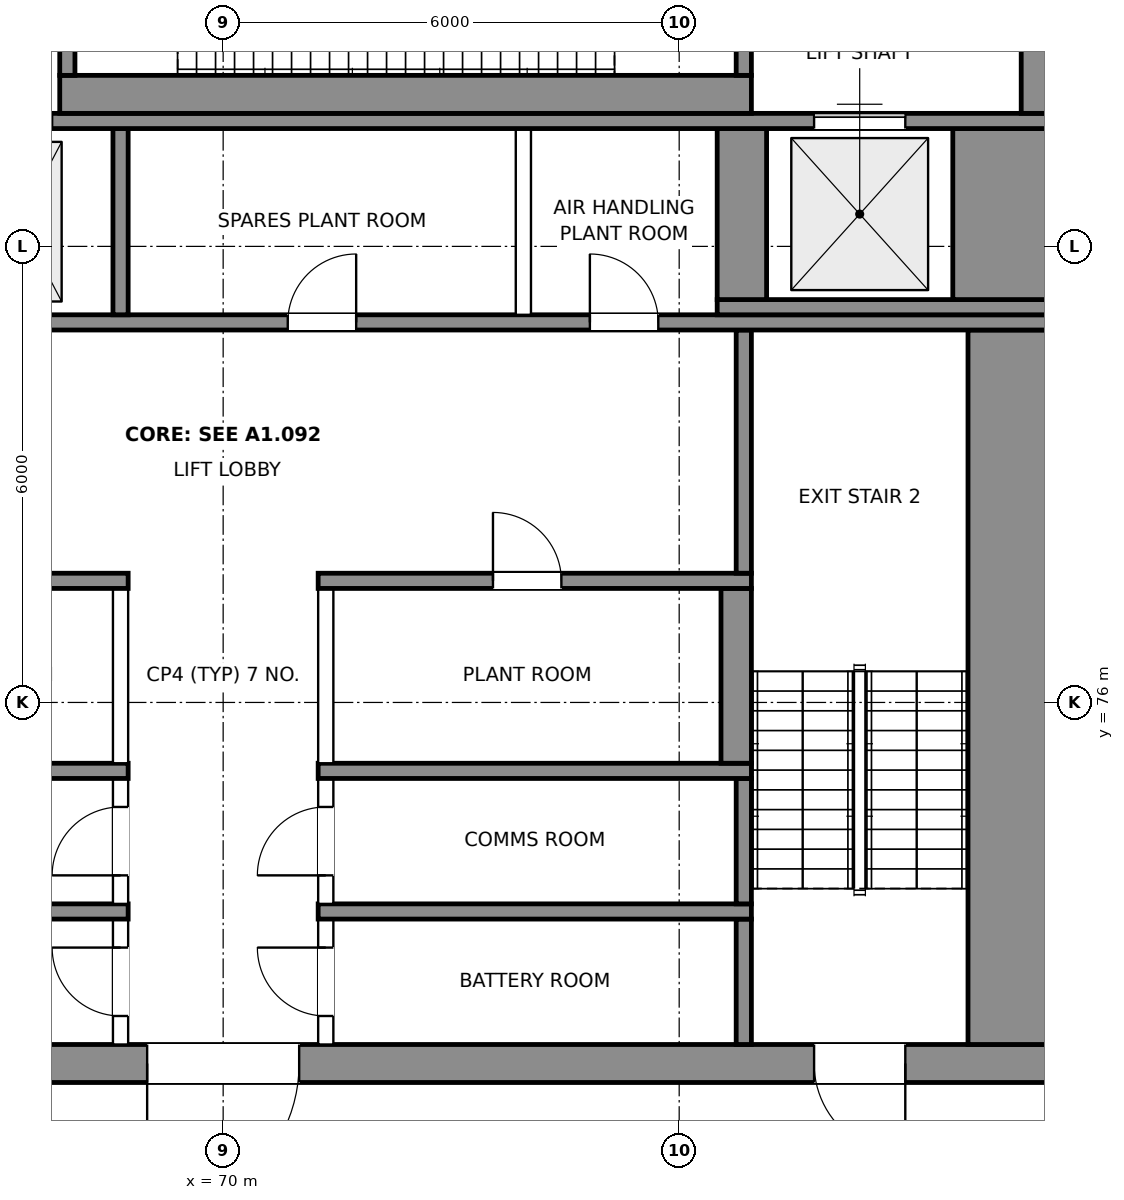
"""IFC4 building model, lengths in metres.
Left out: names, types, materials, properties, quantities, classifications, styles, units other than length and angle.
Written with IfcOpenShell. Run it as: python <this file> out.ifc"""

import sys

from ifc_helpers import new_model, si_unit, direction, frame, frame_2d, origin, place, context, subcontext, project, spatial, rectangle, extrude, element, fill, save


model = new_model("IFC4")
c1 = context("Model", 3, precision=1e-05, world=origin(), true_north=direction((0.0, 1.0)))
c2 = subcontext(c1, "Body", "Model", "MODEL_VIEW")
j1 = project(units=[si_unit("LENGTHUNIT", "METRE"), si_unit("PLANEANGLEUNIT", "RADIAN")], contexts=[c1])
p1 = place(None, origin())
s1 = spatial("IfcSite", under=j1, at=p1, CompositionType="ELEMENT")
p2 = place(p1, origin())
s2 = spatial("IfcBuilding", under=s1, at=p2, CompositionType="ELEMENT")
p3 = place(p2, frame((0.0, 0.0, 333.2)))
s3 = spatial("IfcBuildingStorey", under=s2, at=p3, CompositionType="ELEMENT", Elevation=333.2)
p4 = place(p3, frame((59.0, 71.25, 0.0), z_axis=(0.0, 0.0, 1.0), x_axis=(1.0, 0.0, 0.0)))
e1 = element("IfcWall", 1, at=p4, inside=s3, PredefinedType="SHEAR", context=c2, shape_type="SweptSolid", body=[
    extrude(rectangle(XDim=22.0, YDim=0.5, at=frame_2d((11.0, 0.0))), origin(), (0.0, 0.0, 1.0), 4.5),
])
p5 = place(p4, frame((2.025, 0.0, 0.0)))
e2 = element("IfcOpeningElement", 2, at=p5, cuts=e1, PredefinedType="OPENING", context=c2, shape_type="SweptSolid", body=[
    extrude(rectangle(XDim=1.2, YDim=2.1, at=frame_2d((0.6, 1.05))), frame((0.0, 0.26, 0.0), z_axis=(0.0, -1.0, 0.0), x_axis=(1.0, 0.0, 0.0)), (0.0, 0.0, 1.0), 0.52),
])
p6 = place(p4, frame((18.775, 0.0, 0.0)))
e3 = element("IfcOpeningElement", 3, at=p6, cuts=e1, PredefinedType="OPENING", context=c2, shape_type="SweptSolid", body=[
    extrude(rectangle(XDim=1.2, YDim=2.1, at=frame_2d((0.6, 1.05))), frame((0.0, 0.26, 0.0), z_axis=(0.0, -1.0, 0.0), x_axis=(1.0, 0.0, 0.0)), (0.0, 0.0, 1.0), 0.52),
])
p7 = place(p4, frame((10.0, 0.0, 0.0)))
e4 = element("IfcOpeningElement", 4, at=p7, cuts=e1, PredefinedType="OPENING", context=c2, shape_type="SweptSolid", body=[
    extrude(rectangle(XDim=2.0, YDim=2.1, at=frame_2d((1.0, 1.05))), frame((0.0, 0.26, 0.0), z_axis=(0.0, -1.0, 0.0), x_axis=(1.0, 0.0, 0.0)), (0.0, 0.0, 1.0), 0.52),
])
p8 = place(p3, frame((68.65, 71.5, 0.0), z_axis=(0.0, 0.0, 1.0), x_axis=(0.0, 1.0, 0.0)))
e5 = element("IfcWall", 5, at=p8, inside=s3, PredefinedType="PARTITIONING", context=c2, shape_type="SweptSolid", body=[
    extrude(rectangle(XDim=1.65, YDim=0.2, at=frame_2d((0.825, 0.0))), origin(), (0.0, 0.0, 1.0), 4.2),
])
p9 = place(p8, frame((0.375, 0.0, 0.0)))
e6 = element("IfcOpeningElement", 6, at=p9, cuts=e5, PredefinedType="OPENING", context=c2, shape_type="SweptSolid", body=[
    extrude(rectangle(XDim=0.9, YDim=2.1, at=frame_2d((0.45, 1.05))), frame((0.0, 0.11, 0.0), z_axis=(0.0, -1.0, 0.0), x_axis=(1.0, 0.0, 0.0)), (0.0, 0.0, 1.0), 0.22),
])
p10 = place(p3, frame((71.35, 71.5, 0.0), z_axis=(0.0, 0.0, 1.0), x_axis=(0.0, 1.0, 0.0)))
e7 = element("IfcWall", 7, at=p10, inside=s3, PredefinedType="PARTITIONING", context=c2, shape_type="SweptSolid", body=[
    extrude(rectangle(XDim=1.65, YDim=0.2, at=frame_2d((0.825, 0.0))), origin(), (0.0, 0.0, 1.0), 4.2),
])
p11 = place(p10, frame((0.375, 0.0, 0.0)))
e8 = element("IfcOpeningElement", 8, at=p11, cuts=e7, PredefinedType="OPENING", context=c2, shape_type="SweptSolid", body=[
    extrude(rectangle(XDim=0.9, YDim=2.1, at=frame_2d((0.45, 1.05))), frame((0.0, 0.11, 0.0), z_axis=(0.0, -1.0, 0.0), x_axis=(1.0, 0.0, 0.0)), (0.0, 0.0, 1.0), 0.22),
])
p12 = place(p3, frame((76.85, 71.5, 0.0), z_axis=(0.0, 0.0, 1.0), x_axis=(0.0, 1.0, 0.0)))
e9 = element("IfcWall", 9, at=p12, inside=s3, PredefinedType="SHEAR", context=c2, shape_type="SweptSolid", body=[
    extrude(rectangle(XDim=1.65, YDim=0.2, at=frame_2d((0.825, 0.0))), origin(), (0.0, 0.0, 1.0), 4.5),
])
p13 = place(p3, frame((80.4, 71.5, 0.0), z_axis=(0.0, 0.0, 1.0), x_axis=(0.0, 1.0, 0.0)))
e10 = element("IfcWall", 10, at=p13, inside=s3, PredefinedType="SHEAR", context=c2, shape_type="SweptSolid", body=[
    extrude(rectangle(XDim=9.4, YDim=1.2, at=frame_2d((4.7, 0.0))), origin(), (0.0, 0.0, 1.0), 4.5),
])
for number, where, z_axis, x_axis in (
    (11, (63.05, 73.25, 0.0), (0.0, 0.0, 1.0), (1.0, 0.0, 0.0)),
    (12, (71.25, 73.25, 0.0), (0.0, 0.0, 1.0), (1.0, 0.0, 0.0)),
):
    element("IfcWall", number, at=place(p3, frame(where, z_axis=z_axis, x_axis=x_axis)), inside=s3, PredefinedType="SHEAR", context=c2, shape_type="SweptSolid", body=[
        extrude(rectangle(XDim=5.7, YDim=0.2, at=frame_2d((2.85, 0.0))), origin(), (0.0, 0.0, 1.0), 4.5),
    ])
p14 = place(p3, frame((68.65, 73.35, 0.0), z_axis=(0.0, 0.0, 1.0), x_axis=(0.0, 1.0, 0.0)))
e13 = element("IfcWall", 13, at=p14, inside=s3, PredefinedType="PARTITIONING", context=c2, shape_type="SweptSolid", body=[
    extrude(rectangle(XDim=1.65, YDim=0.2, at=frame_2d((0.825, 0.0))), origin(), (0.0, 0.0, 1.0), 4.2),
])
p15 = place(p14, frame((0.375, 0.0, 0.0)))
e14 = element("IfcOpeningElement", 14, at=p15, cuts=e13, PredefinedType="OPENING", context=c2, shape_type="SweptSolid", body=[
    extrude(rectangle(XDim=0.9, YDim=2.1, at=frame_2d((0.45, 1.05))), frame((0.0, 0.11, 0.0), z_axis=(0.0, -1.0, 0.0), x_axis=(1.0, 0.0, 0.0)), (0.0, 0.0, 1.0), 0.22),
])
p16 = place(p3, frame((71.35, 73.35, 0.0), z_axis=(0.0, 0.0, 1.0), x_axis=(0.0, 1.0, 0.0)))
e15 = element("IfcWall", 15, at=p16, inside=s3, PredefinedType="PARTITIONING", context=c2, shape_type="SweptSolid", body=[
    extrude(rectangle(XDim=1.65, YDim=0.2, at=frame_2d((0.825, 0.0))), origin(), (0.0, 0.0, 1.0), 4.2),
])
p17 = place(p16, frame((0.375, 0.0, 0.0)))
e16 = element("IfcOpeningElement", 16, at=p17, cuts=e15, PredefinedType="OPENING", context=c2, shape_type="SweptSolid", body=[
    extrude(rectangle(XDim=0.9, YDim=2.1, at=frame_2d((0.45, 1.05))), frame((0.0, 0.11, 0.0), z_axis=(0.0, -1.0, 0.0), x_axis=(1.0, 0.0, 0.0)), (0.0, 0.0, 1.0), 0.22),
])
p18 = place(p3, frame((76.85, 73.35, 0.0), z_axis=(0.0, 0.0, 1.0), x_axis=(0.0, 1.0, 0.0)))
e17 = element("IfcWall", 17, at=p18, inside=s3, PredefinedType="SHEAR", context=c2, shape_type="SweptSolid", body=[
    extrude(rectangle(XDim=1.65, YDim=0.2, at=frame_2d((0.825, 0.0))), origin(), (0.0, 0.0, 1.0), 4.5),
])
for number, where, z_axis, x_axis in (
    (18, (63.05, 75.1, 0.0), (0.0, 0.0, 1.0), (1.0, 0.0, 0.0)),
    (19, (71.25, 75.1, 0.0), (0.0, 0.0, 1.0), (1.0, 0.0, 0.0)),
):
    element("IfcWall", number, at=place(p3, frame(where, z_axis=z_axis, x_axis=x_axis)), inside=s3, PredefinedType="SHEAR", context=c2, shape_type="SweptSolid", body=[
        extrude(rectangle(XDim=5.7, YDim=0.2, at=frame_2d((2.85, 0.0))), origin(), (0.0, 0.0, 1.0), 4.5),
    ])
for number, where, z_axis, x_axis in (
    (20, (68.65, 75.2, 0.0), (0.0, 0.0, 1.0), (0.0, 1.0, 0.0)),
    (21, (71.35, 75.2, 0.0), (0.0, 0.0, 1.0), (0.0, 1.0, 0.0)),
):
    element("IfcWall", number, at=place(p3, frame(where, z_axis=z_axis, x_axis=x_axis)), inside=s3, PredefinedType="PARTITIONING", context=c2, shape_type="SweptSolid", body=[
        extrude(rectangle(XDim=2.3, YDim=0.2, at=frame_2d((1.15, 0.0))), origin(), (0.0, 0.0, 1.0), 4.2),
    ])
p19 = place(p3, frame((76.75, 75.2, 0.0), z_axis=(0.0, 0.0, 1.0), x_axis=(0.0, 1.0, 0.0)))
e22 = element("IfcWall", 22, at=p19, inside=s3, PredefinedType="SHEAR", context=c2, shape_type="SweptSolid", body=[
    extrude(rectangle(XDim=2.3, YDim=0.4, at=frame_2d((1.15, 0.0))), origin(), (0.0, 0.0, 1.0), 4.5),
])
p20 = place(p3, frame((63.05, 77.6, 0.0), z_axis=(0.0, 0.0, 1.0), x_axis=(1.0, 0.0, 0.0)))
e23 = element("IfcWall", 23, at=p20, inside=s3, PredefinedType="SHEAR", context=c2, shape_type="SweptSolid", body=[
    extrude(rectangle(XDim=5.7, YDim=0.2, at=frame_2d((2.85, 0.0))), origin(), (0.0, 0.0, 1.0), 4.5),
])
p21 = place(p20, frame((2.5, 0.0, 0.0)))
e24 = element("IfcOpeningElement", 24, at=p21, cuts=e23, PredefinedType="OPENING", context=c2, shape_type="SweptSolid", body=[
    extrude(rectangle(XDim=0.9, YDim=2.1, at=frame_2d((0.45, 1.05))), frame((0.0, 0.11, 0.0), z_axis=(0.0, -1.0, 0.0), x_axis=(1.0, 0.0, 0.0)), (0.0, 0.0, 1.0), 0.22),
])
p22 = place(p3, frame((71.25, 77.6, 0.0), z_axis=(0.0, 0.0, 1.0), x_axis=(1.0, 0.0, 0.0)))
e25 = element("IfcWall", 25, at=p22, inside=s3, PredefinedType="SHEAR", context=c2, shape_type="SweptSolid", body=[
    extrude(rectangle(XDim=5.7, YDim=0.2, at=frame_2d((2.85, 0.0))), origin(), (0.0, 0.0, 1.0), 4.5),
])
p23 = place(p22, frame((2.3, 0.0, 0.0)))
e26 = element("IfcOpeningElement", 26, at=p23, cuts=e25, PredefinedType="OPENING", context=c2, shape_type="SweptSolid", body=[
    extrude(rectangle(XDim=0.9, YDim=2.1, at=frame_2d((0.45, 1.05))), frame((0.0, 0.11, 0.0), z_axis=(0.0, -1.0, 0.0), x_axis=(1.0, 0.0, 0.0)), (0.0, 0.0, 1.0), 0.22),
])
p24 = place(p3, frame((76.85, 77.7, 0.0), z_axis=(0.0, 0.0, 1.0), x_axis=(0.0, 1.0, 0.0)))
e27 = element("IfcWall", 27, at=p24, inside=s3, PredefinedType="SHEAR", context=c2, shape_type="SweptSolid", body=[
    extrude(rectangle(XDim=3.2, YDim=0.2, at=frame_2d((1.6, 0.0))), origin(), (0.0, 0.0, 1.0), 4.5),
])
p25 = place(p3, frame((59.0, 81.0, 0.0), z_axis=(0.0, 0.0, 1.0), x_axis=(1.0, 0.0, 0.0)))
e28 = element("IfcWall", 28, at=p25, inside=s3, PredefinedType="SHEAR", context=c2, shape_type="SweptSolid", body=[
    extrude(rectangle(XDim=22.0, YDim=0.2, at=frame_2d((11.0, 0.0))), origin(), (0.0, 0.0, 1.0), 4.5),
])
p26 = place(p25, frame((11.85, 0.0, 0.0)))
e29 = element("IfcOpeningElement", 29, at=p26, cuts=e28, PredefinedType="OPENING", context=c2, shape_type="SweptSolid", body=[
    extrude(rectangle(XDim=0.9, YDim=2.1, at=frame_2d((0.45, 1.05))), frame((0.0, 0.11, 0.0), z_axis=(0.0, -1.0, 0.0), x_axis=(1.0, 0.0, 0.0)), (0.0, 0.0, 1.0), 0.22),
])
p27 = place(p25, frame((15.825, 0.0, 0.0)))
e30 = element("IfcOpeningElement", 30, at=p27, cuts=e28, PredefinedType="OPENING", context=c2, shape_type="SweptSolid", body=[
    extrude(rectangle(XDim=0.9, YDim=2.1, at=frame_2d((0.45, 1.05))), frame((0.0, 0.11, 0.0), z_axis=(0.0, -1.0, 0.0), x_axis=(1.0, 0.0, 0.0)), (0.0, 0.0, 1.0), 0.22),
])
p28 = place(p3, frame((68.65, 81.1, 0.0), z_axis=(0.0, 0.0, 1.0), x_axis=(0.0, 1.0, 0.0)))
e31 = element("IfcWall", 31, at=p28, inside=s3, PredefinedType="SHEAR", context=c2, shape_type="SweptSolid", body=[
    extrude(rectangle(XDim=2.45, YDim=0.2, at=frame_2d((1.225, 0.0))), origin(), (0.0, 0.0, 1.0), 4.5),
])
p29 = place(p3, frame((73.95, 81.1, 0.0), z_axis=(0.0, 0.0, 1.0), x_axis=(0.0, 1.0, 0.0)))
e32 = element("IfcWall", 32, at=p29, inside=s3, PredefinedType="PARTITIONING", context=c2, shape_type="SweptSolid", body=[
    extrude(rectangle(XDim=2.45, YDim=0.2, at=frame_2d((1.225, 0.0))), origin(), (0.0, 0.0, 1.0), 4.2),
])
p30 = place(p3, frame((76.5, 81.2, 0.0), z_axis=(0.0, 0.0, 1.0), x_axis=(1.0, 0.0, 0.0)))
e33 = element("IfcWall", 33, at=p30, inside=s3, PredefinedType="SHEAR", context=c2, shape_type="SweptSolid", body=[
    extrude(rectangle(XDim=4.5, YDim=0.2, at=frame_2d((2.25, 0.0))), origin(), (0.0, 0.0, 1.0), 4.5),
])
p31 = place(p3, frame((76.825, 81.3, 0.0), z_axis=(0.0, 0.0, 1.0), x_axis=(0.0, 1.0, 0.0)))
e34 = element("IfcWall", 34, at=p31, inside=s3, PredefinedType="SHEAR", context=c2, shape_type="SweptSolid", body=[
    extrude(rectangle(XDim=2.25, YDim=0.65, at=frame_2d((1.125, 0.0))), origin(), (0.0, 0.0, 1.0), 4.5),
])
p32 = place(p3, frame((80.3, 81.3, 0.0), z_axis=(0.0, 0.0, 1.0), x_axis=(0.0, 1.0, 0.0)))
e35 = element("IfcWall", 35, at=p32, inside=s3, PredefinedType="SHEAR", context=c2, shape_type="SweptSolid", body=[
    extrude(rectangle(XDim=2.25, YDim=1.4, at=frame_2d((1.125, 0.0))), origin(), (0.0, 0.0, 1.0), 4.5),
])
p33 = place(p3, frame((59.0, 83.65, 0.0), z_axis=(0.0, 0.0, 1.0), x_axis=(1.0, 0.0, 0.0)))
e36 = element("IfcWall", 36, at=p33, inside=s3, PredefinedType="SHEAR", context=c2, shape_type="SweptSolid", body=[
    extrude(rectangle(XDim=22.0, YDim=0.2, at=frame_2d((11.0, 0.0))), origin(), (0.0, 0.0, 1.0), 4.5),
])
p34 = place(p33, frame((5.125, 0.0, 0.0)))
e37 = element("IfcOpeningElement", 37, at=p34, cuts=e36, PredefinedType="OPENING", context=c2, shape_type="SweptSolid", body=[
    extrude(rectangle(XDim=1.1, YDim=2.1, at=frame_2d((0.55, 1.05))), frame((0.0, 0.11, 0.0), z_axis=(0.0, -1.0, 0.0), x_axis=(1.0, 0.0, 0.0)), (0.0, 0.0, 1.0), 0.22),
])
p35 = place(p33, frame((7.65, 0.0, 0.0)))
e38 = element("IfcOpeningElement", 38, at=p35, cuts=e36, PredefinedType="OPENING", context=c2, shape_type="SweptSolid", body=[
    extrude(rectangle(XDim=1.1, YDim=2.1, at=frame_2d((0.55, 1.05))), frame((0.0, 0.11, 0.0), z_axis=(0.0, -1.0, 0.0), x_axis=(1.0, 0.0, 0.0)), (0.0, 0.0, 1.0), 0.22),
])
p36 = place(p33, frame((18.775, 0.0, 0.0)))
e39 = element("IfcOpeningElement", 39, at=p36, cuts=e36, PredefinedType="OPENING", context=c2, shape_type="SweptSolid", body=[
    extrude(rectangle(XDim=1.2, YDim=2.1, at=frame_2d((0.6, 1.05))), frame((0.0, 0.11, 0.0), z_axis=(0.0, -1.0, 0.0), x_axis=(1.0, 0.0, 0.0)), (0.0, 0.0, 1.0), 0.22),
])
p37 = place(p33, frame((2.075, 0.0, 0.0)))
e40 = element("IfcOpeningElement", 40, at=p37, cuts=e36, PredefinedType="OPENING", context=c2, shape_type="SweptSolid", body=[
    extrude(rectangle(XDim=1.1, YDim=2.1, at=frame_2d((0.55, 1.05))), frame((0.0, 0.11, 0.0), z_axis=(0.0, -1.0, 0.0), x_axis=(1.0, 0.0, 0.0)), (0.0, 0.0, 1.0), 0.22),
])
p38 = place(p3, frame((67.85, 84.0, 0.0), z_axis=(0.0, 0.0, 1.0), x_axis=(1.0, 0.0, 0.0)))
e41 = element("IfcWall", 41, at=p38, inside=s3, PredefinedType="SHEAR", context=c2, shape_type="SweptSolid", body=[
    extrude(rectangle(XDim=9.1, YDim=0.5, at=frame_2d((4.55, 0.0))), origin(), (0.0, 0.0, 1.0), 4.5),
])
p39 = place(p3, frame((80.75, 83.75, 0.0), z_axis=(0.0, 0.0, 1.0), x_axis=(0.0, 1.0, 0.0)))
e42 = element("IfcWall", 42, at=p39, inside=s3, PredefinedType="SHEAR", context=c2, shape_type="SweptSolid", body=[
    extrude(rectangle(XDim=3.75, YDim=0.5, at=frame_2d((1.875, 0.0))), origin(), (0.0, 0.0, 1.0), 4.5),
])
p40 = place(p39, frame((1.275, 0.0, 0.0)))
e43 = element("IfcOpeningElement", 43, at=p40, cuts=e42, PredefinedType="OPENING", context=c2, shape_type="SweptSolid", body=[
    extrude(rectangle(XDim=1.2, YDim=2.1, at=frame_2d((0.6, 1.05))), frame((0.0, 0.26, 0.0), z_axis=(0.0, -1.0, 0.0), x_axis=(1.0, 0.0, 0.0)), (0.0, 0.0, 1.0), 0.52),
])
p41 = place(p3, frame((67.95, 84.25, 0.0), z_axis=(0.0, 0.0, 1.0), x_axis=(0.0, 1.0, 0.0)))
e44 = element("IfcWall", 44, at=p41, inside=s3, PredefinedType="SHEAR", context=c2, shape_type="SweptSolid", body=[
    extrude(rectangle(XDim=2.85, YDim=0.2, at=frame_2d((1.425, 0.0))), origin(), (0.0, 0.0, 1.0), 4.5),
])
p42 = place(p41, frame((0.825, 0.0, 0.0)))
e45 = element("IfcOpeningElement", 45, at=p42, cuts=e44, PredefinedType="OPENING", context=c2, shape_type="SweptSolid", body=[
    extrude(rectangle(XDim=1.2, YDim=2.1, at=frame_2d((0.6, 1.05))), frame((0.0, 0.11, 0.0), z_axis=(0.0, -1.0, 0.0), x_axis=(1.0, 0.0, 0.0)), (0.0, 0.0, 1.0), 0.22),
])
p43 = place(p3, frame((76.85, 84.25, 0.0), z_axis=(0.0, 0.0, 1.0), x_axis=(0.0, 1.0, 0.0)))
e46 = element("IfcWall", 46, at=p43, inside=s3, PredefinedType="SHEAR", context=c2, shape_type="SweptSolid", body=[
    extrude(rectangle(XDim=2.85, YDim=0.2, at=frame_2d((1.425, 0.0))), origin(), (0.0, 0.0, 1.0), 4.5),
])
p44 = place(p43, frame((1.575, 0.0, 0.0)))
e47 = element("IfcOpeningElement", 47, at=p44, cuts=e46, PredefinedType="OPENING", context=c2, shape_type="SweptSolid", body=[
    extrude(rectangle(XDim=1.2, YDim=2.1, at=frame_2d((0.6, 1.05))), frame((0.0, 0.11, 0.0), z_axis=(0.0, -1.0, 0.0), x_axis=(1.0, 0.0, 0.0)), (0.0, 0.0, 1.0), 0.22),
])
p45 = place(p6, frame((1.2, 0.0, 0.0), z_axis=(0.0, 0.0, 1.0), x_axis=(-1.0, 0.0, 0.0)))
e48 = element("IfcDoor", 48, at=p45, inside=s3, OperationType="SINGLE_SWING_LEFT", PredefinedType="DOOR", context=c2, shape_type="SweptSolid", body=[
    extrude(rectangle(XDim=1.2, YDim=2.1, at=frame_2d((0.6, 1.05))), frame((0.0, 0.025, 0.0), z_axis=(0.0, -1.0, 0.0), x_axis=(1.0, 0.0, 0.0)), (0.0, 0.0, 1.0), 0.05),
])
fill(e3, e48)
p46 = place(p7, frame((2.0, 0.0, 0.0), z_axis=(0.0, 0.0, 1.0), x_axis=(-1.0, 0.0, 0.0)))
e49 = element("IfcDoor", 49, at=p46, inside=s3, OperationType="DOUBLE_DOOR_SINGLE_SWING", PredefinedType="DOOR", context=c2, shape_type="SweptSolid", body=[
    extrude(rectangle(XDim=2.0, YDim=2.1, at=frame_2d((1.0, 1.05))), frame((0.0, 0.025, 0.0), z_axis=(0.0, -1.0, 0.0), x_axis=(1.0, 0.0, 0.0)), (0.0, 0.0, 1.0), 0.05),
])
fill(e4, e49)
p47 = place(p9, origin())
e50 = element("IfcDoor", 50, at=p47, inside=s3, OperationType="SINGLE_SWING_RIGHT", PredefinedType="DOOR", context=c2, shape_type="SweptSolid", body=[
    extrude(rectangle(XDim=0.9, YDim=2.1, at=frame_2d((0.45, 1.05))), frame((0.0, 0.025, 0.0), z_axis=(0.0, -1.0, 0.0), x_axis=(1.0, 0.0, 0.0)), (0.0, 0.0, 1.0), 0.05),
])
fill(e6, e50)
p48 = place(p15, origin())
e51 = element("IfcDoor", 51, at=p48, inside=s3, OperationType="SINGLE_SWING_LEFT", PredefinedType="DOOR", context=c2, shape_type="SweptSolid", body=[
    extrude(rectangle(XDim=0.9, YDim=2.1, at=frame_2d((0.45, 1.05))), frame((0.0, 0.025, 0.0), z_axis=(0.0, -1.0, 0.0), x_axis=(1.0, 0.0, 0.0)), (0.0, 0.0, 1.0), 0.05),
])
fill(e14, e51)
p49 = place(p11, origin())
e52 = element("IfcDoor", 52, at=p49, inside=s3, OperationType="SINGLE_SWING_RIGHT", PredefinedType="DOOR", context=c2, shape_type="SweptSolid", body=[
    extrude(rectangle(XDim=0.9, YDim=2.1, at=frame_2d((0.45, 1.05))), frame((0.0, 0.025, 0.0), z_axis=(0.0, -1.0, 0.0), x_axis=(1.0, 0.0, 0.0)), (0.0, 0.0, 1.0), 0.05),
])
fill(e8, e52)
p50 = place(p17, origin())
e53 = element("IfcDoor", 53, at=p50, inside=s3, OperationType="SINGLE_SWING_LEFT", PredefinedType="DOOR", context=c2, shape_type="SweptSolid", body=[
    extrude(rectangle(XDim=0.9, YDim=2.1, at=frame_2d((0.45, 1.05))), frame((0.0, 0.025, 0.0), z_axis=(0.0, -1.0, 0.0), x_axis=(1.0, 0.0, 0.0)), (0.0, 0.0, 1.0), 0.05),
])
fill(e16, e53)
p51 = place(p36, origin())
e54 = element("IfcDoor", 54, at=p51, inside=s3, OperationType="DOUBLE_DOOR_SLIDING", PredefinedType="DOOR", context=c2, shape_type="SweptSolid", body=[
    extrude(rectangle(XDim=1.2, YDim=2.1, at=frame_2d((0.6, 1.05))), frame((0.0, 0.025, 0.0), z_axis=(0.0, -1.0, 0.0), x_axis=(1.0, 0.0, 0.0)), (0.0, 0.0, 1.0), 0.05),
])
fill(e39, e54)
p52 = place(p23, origin())
e55 = element("IfcDoor", 55, at=p52, inside=s3, OperationType="SINGLE_SWING_LEFT", PredefinedType="DOOR", context=c2, shape_type="SweptSolid", body=[
    extrude(rectangle(XDim=0.9, YDim=2.1, at=frame_2d((0.45, 1.05))), frame((0.0, 0.025, 0.0), z_axis=(0.0, -1.0, 0.0), x_axis=(1.0, 0.0, 0.0)), (0.0, 0.0, 1.0), 0.05),
])
fill(e26, e55)
p53 = place(p26, origin())
e56 = element("IfcDoor", 56, at=p53, inside=s3, OperationType="SINGLE_SWING_RIGHT", PredefinedType="DOOR", context=c2, shape_type="SweptSolid", body=[
    extrude(rectangle(XDim=0.9, YDim=2.1, at=frame_2d((0.45, 1.05))), frame((0.0, 0.025, 0.0), z_axis=(0.0, -1.0, 0.0), x_axis=(1.0, 0.0, 0.0)), (0.0, 0.0, 1.0), 0.05),
])
fill(e29, e56)
p54 = place(p27, origin())
e57 = element("IfcDoor", 57, at=p54, inside=s3, OperationType="SINGLE_SWING_LEFT", PredefinedType="DOOR", context=c2, shape_type="SweptSolid", body=[
    extrude(rectangle(XDim=0.9, YDim=2.1, at=frame_2d((0.45, 1.05))), frame((0.0, 0.025, 0.0), z_axis=(0.0, -1.0, 0.0), x_axis=(1.0, 0.0, 0.0)), (0.0, 0.0, 1.0), 0.05),
])
fill(e30, e57)
save(model, sys.argv[1])
